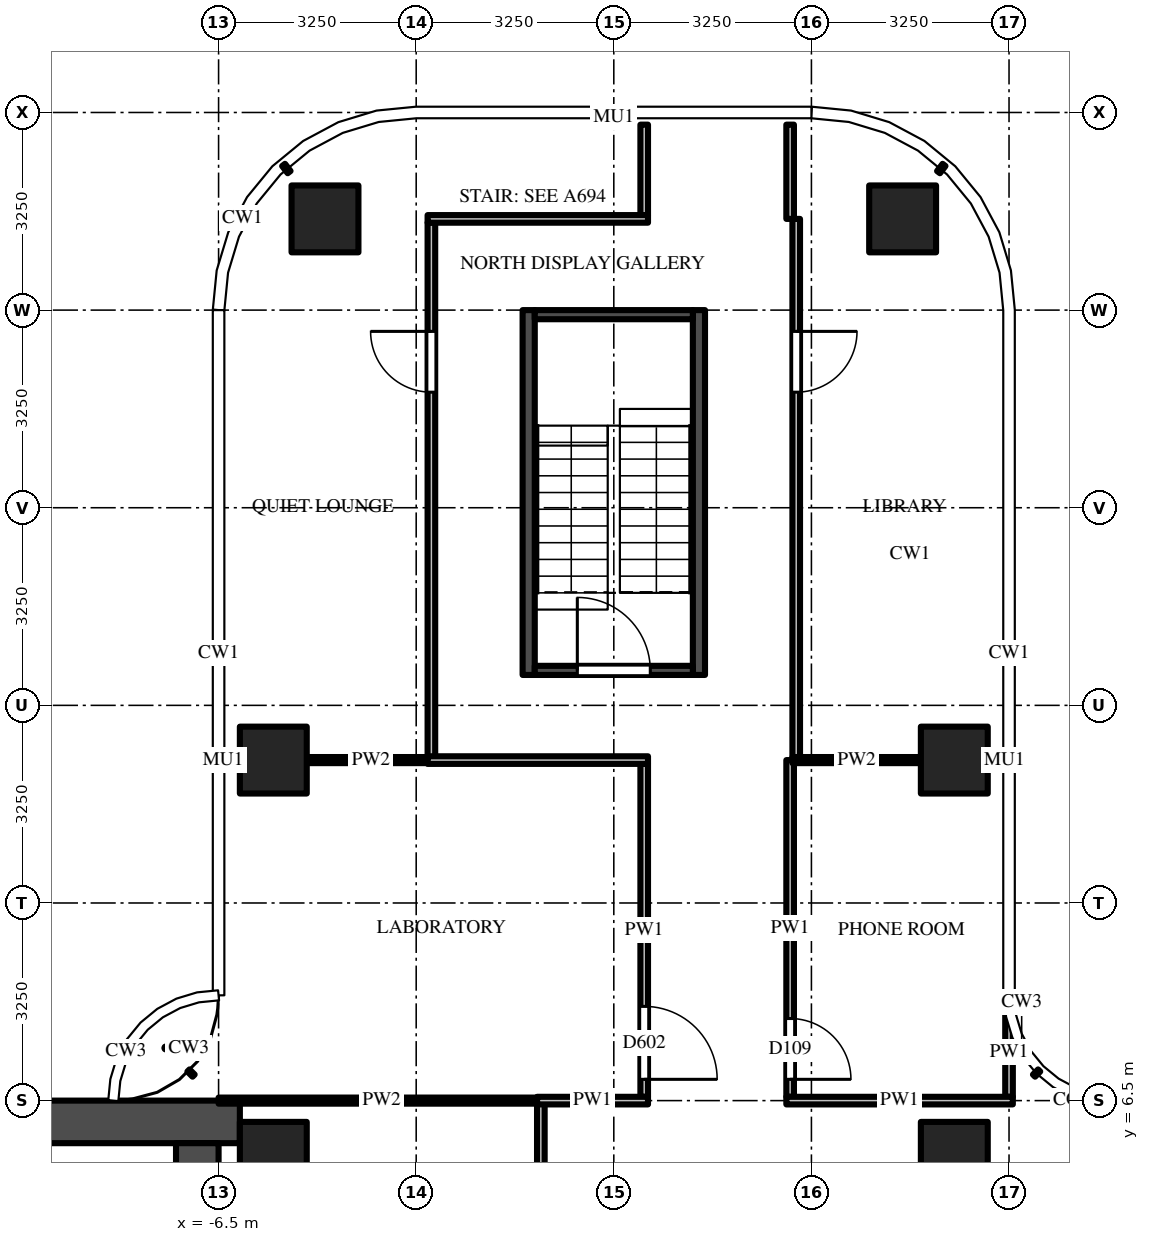
"""IFC4 building model, lengths in metres.
Left out: names, types, materials, properties, quantities, classifications, styles, units other than length and angle.
Written with IfcOpenShell. Run it as: python <this file> out.ifc"""

import sys

from ifc_helpers import new_model, si_unit, direction, frame, frame_2d, origin, origin_2d, place, context, subcontext, project, spatial, rectangle, extrude, source, transform, mapped, element, fill, save


model = new_model("IFC4")
c1 = context("Model", 3, precision=1e-05, world=origin(), true_north=direction((0.0, 1.0)))
c2 = subcontext(c1, "Body", "Model", "MODEL_VIEW")
j1 = project(units=[si_unit("LENGTHUNIT", "METRE"), si_unit("PLANEANGLEUNIT", "RADIAN")], contexts=[c1])
p1 = place(None, origin())
s1 = spatial("IfcSite", under=j1, at=p1, CompositionType="ELEMENT")
p2 = place(p1, origin())
s2 = spatial("IfcBuilding", under=s1, at=p2, CompositionType="ELEMENT")
p3 = place(p2, frame((0.0, 0.0, 240.2)))
s3 = spatial("IfcBuildingStorey", under=s2, at=p3, CompositionType="ELEMENT", Elevation=240.2)
m1 = source(origin(), c2, "Body", "SweptSolid", [
    extrude(rectangle(XDim=1.1, YDim=1.1, at=origin_2d()), origin(), (0.0, 0.0, 1.0), 3.9),
])
for number, where, z_axis, x_axis in (
    (1, (-5.6, 12.1, 0.0), (0.0, 0.0, 1.0), (1.0, 0.0, 0.0)),
    (2, (-4.75, 21.0, 0.0), (0.0, 0.0, 1.0), (1.0, 0.0, 0.0)),
    (3, (5.6, 12.1, 0.0), (0.0, 0.0, 1.0), (1.0, 0.0, 0.0)),
    (4, (4.75, 21.0, 0.0), (0.0, 0.0, 1.0), (1.0, 0.0, 0.0)),
    (5, (5.6, 5.6, 0.0), (0.0, 0.0, 1.0), (1.0, 0.0, 0.0)),
    (6, (-5.6, 5.6, 0.0), (0.0, 0.0, 1.0), (1.0, 0.0, 0.0)),
):
    element("IfcColumn", number, at=place(p3, frame(where, z_axis=z_axis, x_axis=x_axis)), inside=s3, PredefinedType="COLUMN", context=c2, shape_type="MappedRepresentation", body=[
        mapped(m1, transform((0.0, 0.0, 0.0))),
    ])
m2 = source(origin(), c2, "Body", "SweptSolid", [
    extrude(rectangle(XDim=16.6, YDim=0.7, at=frame_2d((8.3, 0.0))), origin(), (0.0, 0.0, 1.0), 3.7),
])
p4 = place(p3, frame((-6.15, 6.15, 0.0), z_axis=(0.0, 0.0, 1.0), x_axis=(-1.0, 0.0, 0.0)))
e7 = element("IfcWall", 7, at=p4, inside=s3, PredefinedType="SHEAR", context=c2, shape_type="MappedRepresentation", body=[
    mapped(m2, transform((0.0, 0.0, 0.0))),
])
m3 = source(origin(), c2, "Body", "SweptSolid", [
    extrude(rectangle(XDim=9.05, YDim=0.7, at=frame_2d((4.525, 0.0))), origin(), (0.0, 0.0, 1.0), 3.7),
])
p5 = place(p3, frame((-6.85, 5.8, 0.0), z_axis=(0.0, 0.0, 1.0), x_axis=(0.0, -1.0, 0.0)))
e8 = element("IfcWall", 8, at=p5, inside=s3, PredefinedType="SHEAR", context=c2, shape_type="MappedRepresentation", body=[
    mapped(m3, transform((0.0, 0.0, 0.0))),
])
m4 = source(origin(), c2, "Body", "SweptSolid", [
    extrude(rectangle(XDim=1.8, YDim=2.1, at=frame_2d((0.9, 1.05))), frame((0.0, 0.36, 0.0), z_axis=(0.0, -1.0, 0.0), x_axis=(1.0, 0.0, 0.0)), (0.0, 0.0, 1.0), 0.72),
])
p6 = place(p5, frame((3.15, 0.0, 0.0)))
e9 = element("IfcOpeningElement", 9, at=p6, cuts=e8, PredefinedType="OPENING", context=c2, shape_type="MappedRepresentation", body=[
    mapped(m4, transform((0.0, 0.0, 0.0))),
])
m5 = source(origin(), c2, "Body", "SweptSolid", [
    extrude(rectangle(XDim=6.0, YDim=0.2, at=frame_2d((3.0, 0.0))), origin(), (0.0, 0.0, 1.0), 3.7),
])
for number, where, z_axis, x_axis in (
    (10, (-1.4, 13.5, 0.0), (0.0, 0.0, 1.0), (0.0, 1.0, 0.0)),
    (11, (1.4, 13.5, 0.0), (0.0, 0.0, 1.0), (0.0, 1.0, 0.0)),
):
    element("IfcWall", number, at=place(p3, frame(where, z_axis=z_axis, x_axis=x_axis)), inside=s3, PredefinedType="SHEAR", context=c2, shape_type="MappedRepresentation", body=[
        mapped(m5, transform((0.0, 0.0, 0.0))),
    ])
m6 = source(origin(), c2, "Body", "SweptSolid", [
    extrude(rectangle(XDim=2.6, YDim=0.15, at=frame_2d((1.3, 0.0))), origin(), (0.0, 0.0, 1.0), 3.7),
])
p7 = place(p3, frame((-1.3, 13.575, 0.0), z_axis=(0.0, 0.0, 1.0), x_axis=(1.0, 0.0, 0.0)))
e12 = element("IfcWall", 12, at=p7, inside=s3, PredefinedType="SHEAR", context=c2, shape_type="MappedRepresentation", body=[
    mapped(m6, transform((0.0, 0.0, 0.0))),
])
m7 = source(origin(), c2, "Body", "SweptSolid", [
    extrude(rectangle(XDim=1.2, YDim=2.1, at=frame_2d((0.6, 1.05))), frame((0.0, 0.085, 0.0), z_axis=(0.0, -1.0, 0.0), x_axis=(1.0, 0.0, 0.0)), (0.0, 0.0, 1.0), 0.17),
])
p8 = place(p7, frame((0.7, 0.0, 0.0)))
e13 = element("IfcOpeningElement", 13, at=p8, cuts=e12, PredefinedType="OPENING", context=c2, shape_type="MappedRepresentation", body=[
    mapped(m7, transform((0.0, 0.0, 0.0))),
])
p9 = place(p3, frame((-1.3, 19.425, 0.0), z_axis=(0.0, 0.0, 1.0), x_axis=(1.0, 0.0, 0.0)))
e14 = element("IfcWall", 14, at=p9, inside=s3, PredefinedType="SHEAR", context=c2, shape_type="MappedRepresentation", body=[
    mapped(m6, transform((0.0, 0.0, 0.0))),
])
m8 = source(origin(), c2, "Body", "SweptSolid", [
    extrude(rectangle(XDim=8.788, YDim=0.125, at=frame_2d((4.394, 0.0))), origin(), (0.0, 0.0, 1.0), 2.78),
])
p10 = place(p3, frame((-3.0, 12.15, 0.0), z_axis=(0.0, 0.0, 1.0), x_axis=(0.0, 1.0, 0.0)))
e15 = element("IfcWall", 15, at=p10, inside=s3, PredefinedType="PARTITIONING", context=c2, shape_type="MappedRepresentation", body=[
    mapped(m8, transform((0.0, 0.0, 0.0))),
])
m9 = source(origin(), c2, "Body", "SweptSolid", [
    extrude(rectangle(XDim=1.0, YDim=2.1, at=frame_2d((0.5, 1.05))), frame((0.0, 0.073, 0.0), z_axis=(0.0, -1.0, 0.0), x_axis=(1.0, 0.0, 0.0)), (0.0, 0.0, 1.0), 0.145),
])
p11 = place(p10, frame((6.0, 0.0, 0.0)))
e16 = element("IfcOpeningElement", 16, at=p11, cuts=e15, PredefinedType="OPENING", context=c2, shape_type="MappedRepresentation", body=[
    mapped(m9, transform((0.0, 0.0, 0.0))),
])
m10 = source(origin(), c2, "Body", "SweptSolid", [
    extrude(rectangle(XDim=3.137, YDim=0.125, at=frame_2d((1.569, 0.0))), origin(), (0.0, 0.0, 1.0), 2.997),
])
p12 = place(p3, frame((-1.2, 6.45, 0.0), z_axis=(0.0, 0.0, 1.0), x_axis=(0.0, -1.0, 0.0)))
e17 = element("IfcWall", 17, at=p12, inside=s3, PredefinedType="PARTITIONING", context=c2, shape_type="MappedRepresentation", body=[
    mapped(m10, transform((0.0, 0.0, 0.0))),
])
m11 = source(origin(), c2, "Body", "SweptSolid", [
    extrude(rectangle(XDim=5.475, YDim=0.125, at=frame_2d((2.738, 0.0))), origin(), (0.0, 0.0, 1.0), 2.997),
])
p13 = place(p3, frame((0.5, 12.038, 0.0), z_axis=(0.0, 0.0, 1.0), x_axis=(0.0, -1.0, 0.0)))
e18 = element("IfcWall", 18, at=p13, inside=s3, PredefinedType="PARTITIONING", context=c2, shape_type="MappedRepresentation", body=[
    mapped(m11, transform((0.0, 0.0, 0.0))),
])
m12 = source(origin(), c2, "Body", "SweptSolid", [
    extrude(rectangle(XDim=1.2, YDim=2.1, at=frame_2d((0.6, 1.05))), frame((0.0, 0.073, 0.0), z_axis=(0.0, -1.0, 0.0), x_axis=(1.0, 0.0, 0.0)), (0.0, 0.0, 1.0), 0.145),
])
p14 = place(p13, frame((3.988, 0.0, 0.0)))
e19 = element("IfcOpeningElement", 19, at=p14, cuts=e18, PredefinedType="OPENING", context=c2, shape_type="MappedRepresentation", body=[
    mapped(m12, transform((0.0, 0.0, 0.0))),
])
m13 = source(origin(), c2, "Body", "SweptSolid", [
    extrude(rectangle(XDim=1.488, YDim=0.125, at=frame_2d((0.744, 0.0))), origin(), (0.0, 0.0, 1.0), 2.78),
])
p15 = place(p3, frame((0.5, 22.55, 0.0), z_axis=(0.0, 0.0, 1.0), x_axis=(0.0, -1.0, 0.0)))
e20 = element("IfcWall", 20, at=p15, inside=s3, PredefinedType="PARTITIONING", context=c2, shape_type="MappedRepresentation", body=[
    mapped(m13, transform((0.0, 0.0, 0.0))),
])
m14 = source(origin(), c2, "Body", "SweptSolid", [
    extrude(rectangle(XDim=5.538, YDim=0.125, at=frame_2d((2.769, 0.0))), origin(), (0.0, 0.0, 1.0), 2.997),
])
p16 = place(p3, frame((2.9, 12.1, 0.0), z_axis=(0.0, 0.0, 1.0), x_axis=(0.0, -1.0, 0.0)))
e21 = element("IfcWall", 21, at=p16, inside=s3, PredefinedType="PARTITIONING", context=c2, shape_type="MappedRepresentation", body=[
    mapped(m14, transform((0.0, 0.0, 0.0))),
])
p17 = place(p16, frame((4.25, 0.0, 0.0)))
e22 = element("IfcOpeningElement", 22, at=p17, cuts=e21, PredefinedType="OPENING", context=c2, shape_type="MappedRepresentation", body=[
    mapped(m9, transform((0.0, 0.0, 0.0))),
])
m15 = source(origin(), c2, "Body", "SweptSolid", [
    extrude(rectangle(XDim=1.55, YDim=0.125, at=frame_2d((0.775, 0.0))), origin(), (0.0, 0.0, 1.0), 2.78),
])
p18 = place(p3, frame((2.9, 22.55, 0.0), z_axis=(0.0, 0.0, 1.0), x_axis=(0.0, -1.0, 0.0)))
e23 = element("IfcWall", 23, at=p18, inside=s3, PredefinedType="PARTITIONING", context=c2, shape_type="MappedRepresentation", body=[
    mapped(m15, transform((0.0, 0.0, 0.0))),
])
m16 = source(origin(), c2, "Body", "SweptSolid", [
    extrude(rectangle(XDim=8.85, YDim=0.125, at=frame_2d((4.425, 0.0))), origin(), (0.0, 0.0, 1.0), 2.78),
])
p19 = place(p3, frame((3.0, 21.0, 0.0), z_axis=(0.0, 0.0, 1.0), x_axis=(0.0, -1.0, 0.0)))
e24 = element("IfcWall", 24, at=p19, inside=s3, PredefinedType="PARTITIONING", context=c2, shape_type="MappedRepresentation", body=[
    mapped(m16, transform((0.0, 0.0, 0.0))),
])
p20 = place(p19, frame((1.85, 0.0, 0.0)))
e25 = element("IfcOpeningElement", 25, at=p20, cuts=e24, PredefinedType="OPENING", context=c2, shape_type="MappedRepresentation", body=[
    mapped(m9, transform((0.0, 0.0, 0.0))),
])
m17 = source(origin(), c2, "Body", "SweptSolid", [
    extrude(rectangle(XDim=1.469, YDim=0.125, at=frame_2d((0.734, 0.0))), origin(), (0.0, 0.0, 1.0), 3.7),
])
p21 = place(p3, frame((6.5, 6.562, 0.0), z_axis=(0.0, 0.0, 1.0), x_axis=(0.0, 1.0, 0.0)))
e26 = element("IfcWall", 26, at=p21, inside=s3, PredefinedType="PARTITIONING", context=c2, shape_type="MappedRepresentation", body=[
    mapped(m17, transform((0.0, 0.0, 0.0))),
])
m18 = source(origin(), c2, "Body", "SweptSolid", [
    extrude(rectangle(XDim=5.363, YDim=0.1, at=frame_2d((2.681, 0.0))), origin(), (0.0, 0.0, 1.0), 2.78),
])
p22 = place(p3, frame((-6.5, 6.5, 0.0), z_axis=(0.0, 0.0, 1.0), x_axis=(1.0, 0.0, 0.0)))
e27 = element("IfcWall", 27, at=p22, inside=s3, PredefinedType="PARTITIONING", context=c2, shape_type="MappedRepresentation", body=[
    mapped(m18, transform((0.0, 0.0, 0.0))),
])
m19 = source(origin(), c2, "Body", "SweptSolid", [
    extrude(rectangle(XDim=1.825, YDim=0.125, at=frame_2d((0.913, 0.0))), origin(), (0.0, 0.0, 1.0), 3.7),
])
p23 = place(p3, frame((-1.262, 6.5, 0.0), z_axis=(0.0, 0.0, 1.0), x_axis=(1.0, 0.0, 0.0)))
e28 = element("IfcWall", 28, at=p23, inside=s3, PredefinedType="PARTITIONING", context=c2, shape_type="MappedRepresentation", body=[
    mapped(m19, transform((0.0, 0.0, 0.0))),
])
m20 = source(origin(), c2, "Body", "SweptSolid", [
    extrude(rectangle(XDim=3.725, YDim=0.125, at=frame_2d((1.863, 0.0))), origin(), (0.0, 0.0, 1.0), 2.78),
])
p24 = place(p3, frame((2.837, 6.5, 0.0), z_axis=(0.0, 0.0, 1.0), x_axis=(1.0, 0.0, 0.0)))
e29 = element("IfcWall", 29, at=p24, inside=s3, PredefinedType="PARTITIONING", context=c2, shape_type="MappedRepresentation", body=[
    mapped(m20, transform((0.0, 0.0, 0.0))),
])
m21 = source(origin(), c2, "Body", "SweptSolid", [
    extrude(rectangle(XDim=2.113, YDim=0.1, at=frame_2d((1.056, 0.0))), origin(), (0.0, 0.0, 1.0), 2.997),
])
for number, where, z_axis, x_axis in (
    (30, (-5.05, 12.1, 0.0), (0.0, 0.0, 1.0), (1.0, 0.0, 0.0)),
    (31, (2.938, 12.1, 0.0), (0.0, 0.0, 1.0), (1.0, 0.0, 0.0)),
):
    element("IfcWall", number, at=place(p3, frame(where, z_axis=z_axis, x_axis=x_axis)), inside=s3, PredefinedType="PARTITIONING", context=c2, shape_type="MappedRepresentation", body=[
        mapped(m21, transform((0.0, 0.0, 0.0))),
    ])
m22 = source(origin(), c2, "Body", "SweptSolid", [
    extrude(rectangle(XDim=3.625, YDim=0.125, at=frame_2d((1.812, 0.0))), origin(), (0.0, 0.0, 1.0), 2.997),
])
p25 = place(p3, frame((0.562, 12.1, 0.0), z_axis=(0.0, 0.0, 1.0), x_axis=(-1.0, 0.0, 0.0)))
e32 = element("IfcWall", 32, at=p25, inside=s3, PredefinedType="PARTITIONING", context=c2, shape_type="MappedRepresentation", body=[
    mapped(m22, transform((0.0, 0.0, 0.0))),
])
m23 = source(origin(), c2, "Body", "SweptSolid", [
    extrude(rectangle(XDim=3.625, YDim=0.125, at=frame_2d((1.812, 0.0))), origin(), (0.0, 0.0, 1.0), 2.78),
])
p26 = place(p3, frame((-3.062, 21.0, 0.0), z_axis=(0.0, 0.0, 1.0), x_axis=(1.0, 0.0, 0.0)))
e33 = element("IfcWall", 33, at=p26, inside=s3, PredefinedType="PARTITIONING", context=c2, shape_type="MappedRepresentation", body=[
    mapped(m23, transform((0.0, 0.0, 0.0))),
])
m24 = source(origin(), c2, "Body", "SweptSolid", [
    extrude(rectangle(XDim=1.2, YDim=2.1, at=frame_2d((0.6, 1.05))), frame((0.0, 0.025, 0.0), z_axis=(0.0, -1.0, 0.0), x_axis=(1.0, 0.0, 0.0)), (0.0, 0.0, 1.0), 0.05),
])
p27 = place(p8, origin())
e34 = element("IfcDoor", 34, at=p27, inside=s3, OperationType="SINGLE_SWING_LEFT", PredefinedType="DOOR", context=c2, shape_type="MappedRepresentation", body=[
    mapped(m24, transform((0.0, 0.0, 0.0))),
])
fill(e13, e34)
m25 = source(origin(), c2, "Body", "SweptSolid", [
    extrude(rectangle(XDim=1.0, YDim=2.1, at=frame_2d((0.5, 1.05))), frame((0.0, 0.025, 0.0), z_axis=(0.0, -1.0, 0.0), x_axis=(1.0, 0.0, 0.0)), (0.0, 0.0, 1.0), 0.05),
])
p28 = place(p17, origin())
e35 = element("IfcDoor", 35, at=p28, inside=s3, OperationType="SINGLE_SWING_RIGHT", PredefinedType="DOOR", context=c2, shape_type="MappedRepresentation", body=[
    mapped(m25, transform((0.0, 0.0, 0.0))),
])
fill(e22, e35)
p29 = place(p14, origin())
e36 = element("IfcDoor", 36, at=p29, inside=s3, OperationType="SINGLE_SWING_RIGHT", PredefinedType="DOOR", context=c2, shape_type="MappedRepresentation", body=[
    mapped(m24, transform((0.0, 0.0, 0.0))),
])
fill(e19, e36)
p30 = place(p11, origin())
e37 = element("IfcDoor", 37, at=p30, inside=s3, OperationType="SINGLE_SWING_RIGHT", PredefinedType="DOOR", context=c2, shape_type="MappedRepresentation", body=[
    mapped(m25, transform((0.0, 0.0, 0.0))),
])
fill(e16, e37)
p31 = place(p20, origin())
e38 = element("IfcDoor", 38, at=p31, inside=s3, OperationType="SINGLE_SWING_LEFT", PredefinedType="DOOR", context=c2, shape_type="MappedRepresentation", body=[
    mapped(m25, transform((0.0, 0.0, 0.0))),
])
fill(e25, e38)
save(model, sys.argv[1])
